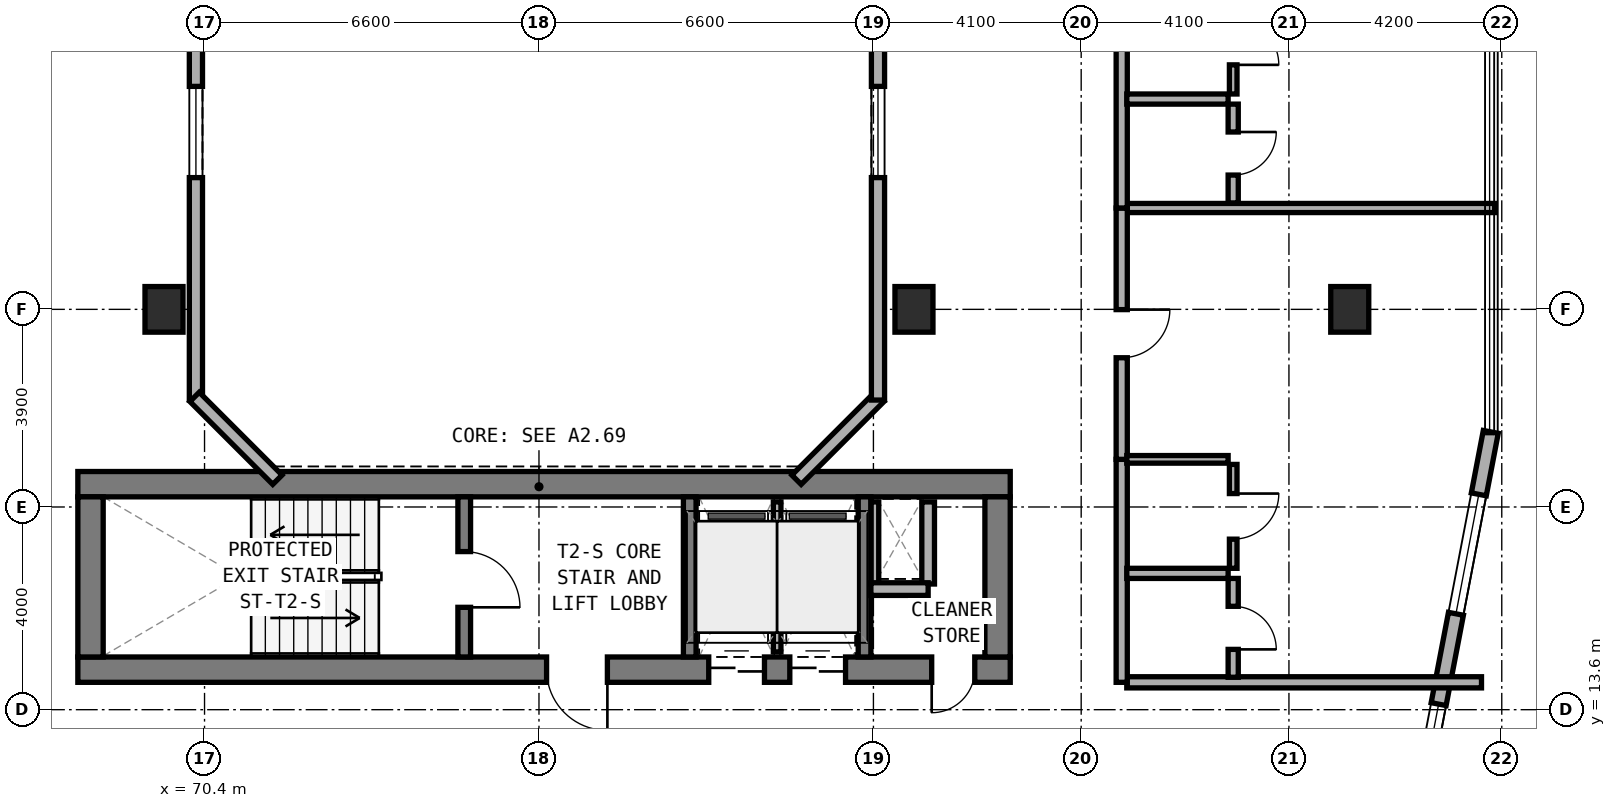
"""IFC4 building model, lengths in metres.
Left out: names, types, materials, properties, quantities, classifications, styles, units other than length and angle.
Written with IfcOpenShell. Run it as: python <this file> out.ifc"""

import sys

from ifc_helpers import new_model, si_unit, direction, frame, frame_2d, origin, origin_2d, place, context, subcontext, project, spatial, rectangle, extrude, element, fill, save


model = new_model("IFC4")
c1 = context("Model", 3, precision=1e-05, world=origin(), true_north=direction((0.0, 1.0)))
c2 = subcontext(c1, "Body", "Model", "MODEL_VIEW")
j1 = project(units=[si_unit("LENGTHUNIT", "METRE"), si_unit("PLANEANGLEUNIT", "RADIAN")], contexts=[c1])
p1 = place(None, origin())
s1 = spatial("IfcSite", under=j1, at=p1, CompositionType="ELEMENT")
p2 = place(p1, origin())
s2 = spatial("IfcBuilding", under=s1, at=p2, CompositionType="ELEMENT")
p3 = place(p2, frame((0.0, 0.0, 69.5)))
s3 = spatial("IfcBuildingStorey", under=s2, at=p3, CompositionType="ELEMENT", Elevation=69.5)
p4 = place(p3, frame((67.9, 14.39, 0.0), z_axis=(0.0, 0.0, 1.0), x_axis=(1.0, 0.0, 0.0)))
e1 = element("IfcWall", 1, at=p4, inside=s3, PredefinedType="SHEAR", context=c2, shape_type="SweptSolid", body=[
    extrude(rectangle(XDim=18.4, YDim=0.5, at=frame_2d((9.2, 0.0))), origin(), (0.0, 0.0, 1.0), 3.5),
])
p5 = place(p4, frame((9.25, 0.0, 0.0)))
e2 = element("IfcOpeningElement", 2, at=p5, cuts=e1, PredefinedType="OPENING", context=c2, shape_type="SweptSolid", body=[
    extrude(rectangle(XDim=1.2, YDim=2.15, at=frame_2d((0.6, 1.075))), frame((0.0, 0.26, 0.0), z_axis=(0.0, -1.0, 0.0), x_axis=(1.0, 0.0, 0.0)), (0.0, 0.0, 1.0), 0.52),
])
p6 = place(p4, frame((16.85, 0.0, 0.0)))
e3 = element("IfcOpeningElement", 3, at=p6, cuts=e1, PredefinedType="OPENING", context=c2, shape_type="SweptSolid", body=[
    extrude(rectangle(XDim=0.85, YDim=2.1, at=frame_2d((0.425, 1.05))), frame((0.0, 0.26, 0.0), z_axis=(0.0, -1.0, 0.0), x_axis=(1.0, 0.0, 0.0)), (0.0, 0.0, 1.0), 0.52),
])
p7 = place(p4, frame((12.45, 0.0, 0.0)))
e4 = element("IfcOpeningElement", 4, at=p7, cuts=e1, PredefinedType="OPENING", context=c2, shape_type="SweptSolid", body=[
    extrude(rectangle(XDim=1.1, YDim=2.15, at=frame_2d((0.55, 1.075))), frame((0.0, 0.26, 0.0), z_axis=(0.0, -1.0, 0.0), x_axis=(1.0, 0.0, 0.0)), (0.0, 0.0, 1.0), 0.52),
])
p8 = place(p4, frame((14.05, 0.0, 0.0)))
e5 = element("IfcOpeningElement", 5, at=p8, cuts=e1, PredefinedType="OPENING", context=c2, shape_type="SweptSolid", body=[
    extrude(rectangle(XDim=1.1, YDim=2.15, at=frame_2d((0.55, 1.075))), frame((0.0, 0.26, 0.0), z_axis=(0.0, -1.0, 0.0), x_axis=(1.0, 0.0, 0.0)), (0.0, 0.0, 1.0), 0.52),
])
p9 = place(p3, frame((67.9, 18.05, 0.0), z_axis=(0.0, 0.0, 1.0), x_axis=(1.0, 0.0, 0.0)))
e6 = element("IfcWall", 6, at=p9, inside=s3, PredefinedType="SHEAR", context=c2, shape_type="SweptSolid", body=[
    extrude(rectangle(XDim=18.4, YDim=0.5, at=frame_2d((9.2, 0.0))), origin(), (0.0, 0.0, 1.0), 3.5),
])
for number, where, z_axis, x_axis in (
    (7, (68.15, 14.64, 0.0), (0.0, 0.0, 1.0), (0.0, 1.0, 0.0)),
    (8, (86.05, 14.64, 0.0), (0.0, 0.0, 1.0), (0.0, 1.0, 0.0)),
):
    element("IfcWall", number, at=place(p3, frame(where, z_axis=z_axis, x_axis=x_axis)), inside=s3, PredefinedType="SHEAR", context=c2, shape_type="SweptSolid", body=[
        extrude(rectangle(XDim=3.16, YDim=0.5, at=frame_2d((1.58, 0.0))), origin(), (0.0, 0.0, 1.0), 3.5),
    ])
p10 = place(p3, frame((75.525, 14.64, 0.0), z_axis=(0.0, 0.0, 1.0), x_axis=(0.0, 1.0, 0.0)))
e9 = element("IfcWall", 9, at=p10, inside=s3, PredefinedType="STANDARD", context=c2, shape_type="SweptSolid", body=[
    extrude(rectangle(XDim=3.16, YDim=0.25, at=frame_2d((1.58, 0.0))), origin(), (0.0, 0.0, 1.0), 3.25),
])
p11 = place(p10, frame((0.98, 0.0, 0.0)))
e10 = element("IfcOpeningElement", 10, at=p11, cuts=e9, PredefinedType="OPENING", context=c2, shape_type="SweptSolid", body=[
    extrude(rectangle(XDim=1.1, YDim=2.15, at=frame_2d((0.55, 1.075))), frame((0.0, 0.135, 0.0), z_axis=(0.0, -1.0, 0.0), x_axis=(1.0, 0.0, 0.0)), (0.0, 0.0, 1.0), 0.27),
])
for number, where, z_axis, x_axis in (
    (11, (79.975, 14.64, 0.0), (0.0, 0.0, 1.0), (0.0, 1.0, 0.0)),
    (12, (83.425, 14.64, 0.0), (0.0, 0.0, 1.0), (0.0, 1.0, 0.0)),
):
    element("IfcWall", number, at=place(p3, frame(where, z_axis=z_axis, x_axis=x_axis)), inside=s3, PredefinedType="STANDARD", context=c2, shape_type="SweptSolid", body=[
        extrude(rectangle(XDim=3.16, YDim=0.25, at=frame_2d((1.58, 0.0))), origin(), (0.0, 0.0, 1.0), 3.25),
    ])
for number, where, z_axis, x_axis in (
    (13, (93.0, 21.5, 0.0), (0.0, 0.0, 1.0), (1.0, 0.0, 0.0)),
    (14, (69.6, 21.5, 0.0), (0.0, 0.0, 1.0), (1.0, 0.0, 0.0)),
    (15, (84.4, 21.5, 0.0), (0.0, 0.0, 1.0), (1.0, 0.0, 0.0)),
):
    element("IfcColumn", number, at=place(p3, frame(where, z_axis=z_axis, x_axis=x_axis)), inside=s3, PredefinedType="COLUMN", context=c2, shape_type="SweptSolid", body=[
        extrude(rectangle(XDim=0.75, YDim=0.9, at=origin_2d()), origin(), (0.0, 0.0, 1.0), 3.5),
    ])
p12 = place(p3, frame((93.971, 9.62, 0.0), z_axis=(0.0, 0.0, 1.0), x_axis=(0.188087874316, 0.982152203854, 0.0)))
e16 = element("IfcWall", 16, at=p12, inside=s3, PredefinedType="STANDARD", context=c2, shape_type="SweptSolid", body=[
    extrude(rectangle(XDim=9.634, YDim=0.3, at=frame_2d((4.817, 0.0))), origin(), (0.0, 0.0, 1.0), 3.25),
])
p13 = place(p12, frame((0.452, 0.0, 0.85)))
e17 = element("IfcOpeningElement", 17, at=p13, cuts=e16, PredefinedType="OPENING", context=c2, shape_type="SweptSolid", body=[
    extrude(rectangle(XDim=1.5, YDim=1.5, at=frame_2d((0.75, 0.75))), frame((0.0, 0.16, 0.0), z_axis=(0.0, -1.0, 0.0), x_axis=(1.0, 0.0, 0.0)), (0.0, 0.0, 1.0), 0.32),
])
p14 = place(p12, frame((2.964, 0.0, 0.85)))
e18 = element("IfcOpeningElement", 18, at=p14, cuts=e16, PredefinedType="OPENING", context=c2, shape_type="SweptSolid", body=[
    extrude(rectangle(XDim=1.2, YDim=1.5, at=frame_2d((0.6, 0.75))), frame((0.0, 0.16, 0.0), z_axis=(0.0, -1.0, 0.0), x_axis=(1.0, 0.0, 0.0)), (0.0, 0.0, 1.0), 0.32),
])
p15 = place(p12, frame((5.979, 0.0, 0.8)))
e19 = element("IfcOpeningElement", 19, at=p15, cuts=e16, PredefinedType="OPENING", context=c2, shape_type="SweptSolid", body=[
    extrude(rectangle(XDim=2.4, YDim=1.6, at=frame_2d((1.2, 0.8))), frame((0.0, 0.16, 0.0), z_axis=(0.0, -1.0, 0.0), x_axis=(1.0, 0.0, 0.0)), (0.0, 0.0, 1.0), 0.32),
])
p16 = place(p3, frame((82.082, 18.138, 0.0), z_axis=(0.0, 0.0, 1.0), x_axis=(0.707106781187, 0.707106781187, 0.0)))
e20 = element("IfcWall", 20, at=p16, inside=s3, PredefinedType="STANDARD", context=c2, shape_type="SweptSolid", body=[
    extrude(rectangle(XDim=2.311, YDim=0.26, at=frame_2d((1.155, 0.0))), origin(), (0.0, 0.0, 1.0), 3.25),
])
p17 = place(p3, frame((83.69, 19.71, 0.0), z_axis=(0.0, 0.0, 1.0), x_axis=(0.0, 1.0, 0.0)))
e21 = element("IfcWall", 21, at=p17, inside=s3, PredefinedType="STANDARD", context=c2, shape_type="SweptSolid", body=[
    extrude(rectangle(XDim=10.58, YDim=0.26, at=frame_2d((5.29, 0.0))), origin(), (0.0, 0.0, 1.0), 3.25),
])
p18 = place(p17, frame((4.39, 0.0, 0.85)))
e22 = element("IfcOpeningElement", 22, at=p18, cuts=e21, PredefinedType="OPENING", context=c2, shape_type="SweptSolid", body=[
    extrude(rectangle(XDim=1.8, YDim=1.5, at=frame_2d((0.9, 0.75))), frame((0.0, 0.14, 0.0), z_axis=(0.0, -1.0, 0.0), x_axis=(1.0, 0.0, 0.0)), (0.0, 0.0, 1.0), 0.28),
])
p19 = place(p3, frame((70.23, 30.29, 0.0), z_axis=(0.0, 0.0, 1.0), x_axis=(0.0, -1.0, 0.0)))
e23 = element("IfcWall", 23, at=p19, inside=s3, PredefinedType="STANDARD", context=c2, shape_type="SweptSolid", body=[
    extrude(rectangle(XDim=10.58, YDim=0.26, at=frame_2d((5.29, 0.0))), origin(), (0.0, 0.0, 1.0), 3.25),
])
p20 = place(p19, frame((4.39, 0.0, 0.85)))
e24 = element("IfcOpeningElement", 24, at=p20, cuts=e23, PredefinedType="OPENING", context=c2, shape_type="SweptSolid", body=[
    extrude(rectangle(XDim=1.8, YDim=1.5, at=frame_2d((0.9, 0.75))), frame((0.0, 0.14, 0.0), z_axis=(0.0, -1.0, 0.0), x_axis=(1.0, 0.0, 0.0)), (0.0, 0.0, 1.0), 0.28),
])
p21 = place(p3, frame((70.204, 19.772, 0.0), z_axis=(0.0, 0.0, 1.0), x_axis=(0.707053950914, -0.707159607512, 0.0)))
e25 = element("IfcWall", 25, at=p21, inside=s3, PredefinedType="STANDARD", context=c2, shape_type="SweptSolid", body=[
    extrude(rectangle(XDim=2.311, YDim=0.26, at=frame_2d((1.155, 0.0))), origin(), (0.0, 0.0, 1.0), 3.25),
])
p22 = place(p3, frame((83.63, 16.08, 0.0), z_axis=(0.0, 0.0, 1.0), x_axis=(0.0, 1.0, 0.0)))
e26 = element("IfcWall", 26, at=p22, inside=s3, PredefinedType="PARTITIONING", context=c2, shape_type="SweptSolid", body=[
    extrude(rectangle(XDim=1.62, YDim=0.15, at=frame_2d((0.81, 0.0))), origin(), (0.0, 0.0, 1.0), 2.725),
])
p23 = place(p3, frame((84.68, 16.08, 0.0), z_axis=(0.0, 0.0, 1.0), x_axis=(0.0, 1.0, 0.0)))
e27 = element("IfcWall", 27, at=p23, inside=s3, PredefinedType="SOLIDWALL", context=c2, shape_type="SweptSolid", body=[
    extrude(rectangle(XDim=1.62, YDim=0.25, at=frame_2d((0.81, 0.0))), origin(), (0.0, 0.0, 1.0), 3.22),
])
p24 = place(p3, frame((83.55, 15.98, 0.0), z_axis=(0.0, 0.0, 1.0), x_axis=(1.0, 0.0, 0.0)))
e28 = element("IfcWall", 28, at=p24, inside=s3, PredefinedType="SOLIDWALL", context=c2, shape_type="SweptSolid", body=[
    extrude(rectangle(XDim=1.13, YDim=0.25, at=frame_2d((0.565, 0.0))), origin(), (0.0, 0.0, 1.0), 3.22),
])
p25 = place(p3, frame((81.7, 14.74, 0.0), z_axis=(0.0, 0.0, 1.0), x_axis=(0.0, 1.0, 0.0)))
e29 = element("IfcWall", 29, at=p25, inside=s3, PredefinedType="PARTITIONING", context=c2, shape_type="SweptSolid", body=[
    extrude(rectangle(XDim=2.96, YDim=0.15, at=frame_2d((1.48, 0.0))), origin(), (0.0, 0.0, 1.0), 3.22),
])
p26 = place(p3, frame((88.6, 14.14, 0.0), z_axis=(0.0, 0.0, 1.0), x_axis=(1.0, 0.0, 0.0)))
e30 = element("IfcWall", 30, at=p26, inside=s3, PredefinedType="SOLIDWALL", context=c2, shape_type="SweptSolid", body=[
    extrude(rectangle(XDim=7.0, YDim=0.22, at=frame_2d((3.5, 0.0))), origin(), (0.0, 0.0, 1.0), 2.865),
])
p27 = place(p3, frame((88.5, 23.5, 0.0), z_axis=(0.0, 0.0, 1.0), x_axis=(1.0, 0.0, 0.0)))
e31 = element("IfcWall", 31, at=p27, inside=s3, PredefinedType="SOLIDWALL", context=c2, shape_type="SweptSolid", body=[
    extrude(rectangle(XDim=7.36, YDim=0.18, at=frame_2d((3.68, 0.0))), origin(), (0.0, 0.0, 1.0), 2.865),
])
p28 = place(p3, frame((88.5, 14.14, 0.0), z_axis=(0.0, 0.0, 1.0), x_axis=(0.0, 1.0, 0.0)))
e32 = element("IfcWall", 32, at=p28, inside=s3, PredefinedType="SOLIDWALL", context=c2, shape_type="SweptSolid", body=[
    extrude(rectangle(XDim=4.4, YDim=0.22, at=frame_2d((2.2, 0.0))), origin(), (0.0, 0.0, 1.0), 3.22),
])
p29 = place(p3, frame((88.5, 18.54, 0.0), z_axis=(0.0, 0.0, 1.0), x_axis=(0.0, 1.0, 0.0)))
e33 = element("IfcWall", 33, at=p29, inside=s3, PredefinedType="SOLIDWALL", context=c2, shape_type="SweptSolid", body=[
    extrude(rectangle(XDim=4.96, YDim=0.22, at=frame_2d((2.48, 0.0))), origin(), (0.0, 0.0, 1.0), 2.725),
])
p30 = place(p29, frame((2.005, 0.0, 0.0)))
e34 = element("IfcOpeningElement", 34, at=p30, cuts=e33, PredefinedType="OPENING", context=c2, shape_type="SweptSolid", body=[
    extrude(rectangle(XDim=0.95, YDim=2.1, at=frame_2d((0.475, 1.05))), frame((0.0, 0.12, 0.0), z_axis=(0.0, -1.0, 0.0), x_axis=(1.0, 0.0, 0.0)), (0.0, 0.0, 1.0), 0.24),
])
p31 = place(p3, frame((88.6, 16.29, 0.0), z_axis=(0.0, 0.0, 1.0), x_axis=(1.0, 0.0, 0.0)))
e35 = element("IfcWall", 35, at=p31, inside=s3, PredefinedType="PLUMBINGWALL", context=c2, shape_type="SweptSolid", body=[
    extrude(rectangle(XDim=2.0, YDim=0.2, at=frame_2d((1.0, 0.0))), origin(), (0.0, 0.0, 1.0), 3.22),
])
p32 = place(p3, frame((88.6, 18.54, 0.0), z_axis=(0.0, 0.0, 1.0), x_axis=(1.0, 0.0, 0.0)))
e36 = element("IfcWall", 36, at=p32, inside=s3, PredefinedType="PARTITIONING", context=c2, shape_type="SweptSolid", body=[
    extrude(rectangle(XDim=2.0, YDim=0.15, at=frame_2d((1.0, 0.0))), origin(), (0.0, 0.0, 1.0), 3.22),
])
p33 = place(p3, frame((90.7, 14.24, 0.0), z_axis=(0.0, 0.0, 1.0), x_axis=(0.0, 1.0, 0.0)))
e37 = element("IfcWall", 37, at=p33, inside=s3, PredefinedType="PLUMBINGWALL", context=c2, shape_type="SweptSolid", body=[
    extrude(rectangle(XDim=1.95, YDim=0.2, at=frame_2d((0.975, 0.0))), origin(), (0.0, 0.0, 1.0), 3.22),
])
p34 = place(p33, frame((0.55, 0.0, 0.0)))
e38 = element("IfcOpeningElement", 38, at=p34, cuts=e37, PredefinedType="OPENING", context=c2, shape_type="SweptSolid", body=[
    extrude(rectangle(XDim=0.85, YDim=2.1, at=frame_2d((0.425, 1.05))), frame((0.0, 0.11, 0.0), z_axis=(0.0, -1.0, 0.0), x_axis=(1.0, 0.0, 0.0)), (0.0, 0.0, 1.0), 0.22),
])
p35 = place(p3, frame((90.7, 16.39, 0.0), z_axis=(0.0, 0.0, 1.0), x_axis=(0.0, 1.0, 0.0)))
e39 = element("IfcWall", 39, at=p35, inside=s3, PredefinedType="PARTITIONING", context=c2, shape_type="SweptSolid", body=[
    extrude(rectangle(XDim=2.05, YDim=0.15, at=frame_2d((1.025, 0.0))), origin(), (0.0, 0.0, 1.0), 3.22),
])
p36 = place(p35, frame((0.575, 0.0, 0.0)))
e40 = element("IfcOpeningElement", 40, at=p36, cuts=e39, PredefinedType="OPENING", context=c2, shape_type="SweptSolid", body=[
    extrude(rectangle(XDim=0.9, YDim=2.1, at=frame_2d((0.45, 1.05))), frame((0.0, 0.085, 0.0), z_axis=(0.0, -1.0, 0.0), x_axis=(1.0, 0.0, 0.0)), (0.0, 0.0, 1.0), 0.17),
])
p37 = place(p3, frame((88.5, 23.5, 0.0), z_axis=(0.0, 0.0, 1.0), x_axis=(0.0, 1.0, 0.0)))
e41 = element("IfcWall", 41, at=p37, inside=s3, PredefinedType="SOLIDWALL", context=c2, shape_type="SweptSolid", body=[
    extrude(rectangle(XDim=4.4, YDim=0.22, at=frame_2d((2.2, 0.0))), origin(), (0.0, 0.0, 1.0), 3.22),
])
p38 = place(p3, frame((88.6, 25.65, 0.0), z_axis=(0.0, 0.0, 1.0), x_axis=(1.0, 0.0, 0.0)))
e42 = element("IfcWall", 42, at=p38, inside=s3, PredefinedType="PLUMBINGWALL", context=c2, shape_type="SweptSolid", body=[
    extrude(rectangle(XDim=2.0, YDim=0.2, at=frame_2d((1.0, 0.0))), origin(), (0.0, 0.0, 1.0), 3.22),
])
p39 = place(p3, frame((90.7, 23.6, 0.0), z_axis=(0.0, 0.0, 1.0), x_axis=(0.0, 1.0, 0.0)))
e43 = element("IfcWall", 43, at=p39, inside=s3, PredefinedType="PLUMBINGWALL", context=c2, shape_type="SweptSolid", body=[
    extrude(rectangle(XDim=1.95, YDim=0.2, at=frame_2d((0.975, 0.0))), origin(), (0.0, 0.0, 1.0), 3.22),
])
p40 = place(p39, frame((0.55, 0.0, 0.0)))
e44 = element("IfcOpeningElement", 44, at=p40, cuts=e43, PredefinedType="OPENING", context=c2, shape_type="SweptSolid", body=[
    extrude(rectangle(XDim=0.85, YDim=2.1, at=frame_2d((0.425, 1.05))), frame((0.0, 0.11, 0.0), z_axis=(0.0, -1.0, 0.0), x_axis=(1.0, 0.0, 0.0)), (0.0, 0.0, 1.0), 0.22),
])
p41 = place(p3, frame((90.7, 25.75, 0.0), z_axis=(0.0, 0.0, 1.0), x_axis=(0.0, 1.0, 0.0)))
e45 = element("IfcWall", 45, at=p41, inside=s3, PredefinedType="PARTITIONING", context=c2, shape_type="SweptSolid", body=[
    extrude(rectangle(XDim=2.05, YDim=0.15, at=frame_2d((1.025, 0.0))), origin(), (0.0, 0.0, 1.0), 3.22),
])
p42 = place(p41, frame((0.575, 0.0, 0.0)))
e46 = element("IfcOpeningElement", 46, at=p42, cuts=e45, PredefinedType="OPENING", context=c2, shape_type="SweptSolid", body=[
    extrude(rectangle(XDim=0.9, YDim=2.1, at=frame_2d((0.45, 1.05))), frame((0.0, 0.085, 0.0), z_axis=(0.0, -1.0, 0.0), x_axis=(1.0, 0.0, 0.0)), (0.0, 0.0, 1.0), 0.17),
])
p43 = place(p14, origin())
e47 = element("IfcWindow", 47, at=p43, inside=s3, PartitioningType="SINGLE_PANEL", PredefinedType="WINDOW", context=c2, shape_type="SweptSolid", body=[
    extrude(rectangle(XDim=1.2, YDim=1.5, at=frame_2d((0.6, 0.75))), frame((0.0, 0.03, 0.0), z_axis=(0.0, -1.0, 0.0), x_axis=(1.0, 0.0, 0.0)), (0.0, 0.0, 1.0), 0.06),
])
fill(e18, e47)
p44 = place(p15, origin())
e48 = element("IfcWindow", 48, at=p44, inside=s3, PartitioningType="SINGLE_PANEL", PredefinedType="WINDOW", context=c2, shape_type="SweptSolid", body=[
    extrude(rectangle(XDim=2.4, YDim=1.6, at=frame_2d((1.2, 0.8))), frame((0.0, 0.03, 0.0), z_axis=(0.0, -1.0, 0.0), x_axis=(1.0, 0.0, 0.0)), (0.0, 0.0, 1.0), 0.06),
])
fill(e19, e48)
p45 = place(p18, origin())
e49 = element("IfcWindow", 49, at=p45, inside=s3, PartitioningType="SINGLE_PANEL", PredefinedType="WINDOW", context=c2, shape_type="SweptSolid", body=[
    extrude(rectangle(XDim=1.8, YDim=1.5, at=frame_2d((0.9, 0.75))), frame((0.0, 0.03, 0.0), z_axis=(0.0, -1.0, 0.0), x_axis=(1.0, 0.0, 0.0)), (0.0, 0.0, 1.0), 0.06),
])
fill(e22, e49)
p46 = place(p20, origin())
e50 = element("IfcWindow", 50, at=p46, inside=s3, PartitioningType="SINGLE_PANEL", PredefinedType="WINDOW", context=c2, shape_type="SweptSolid", body=[
    extrude(rectangle(XDim=1.8, YDim=1.5, at=frame_2d((0.9, 0.75))), frame((0.0, 0.03, 0.0), z_axis=(0.0, -1.0, 0.0), x_axis=(1.0, 0.0, 0.0)), (0.0, 0.0, 1.0), 0.06),
])
fill(e24, e50)
p47 = place(p11, frame((1.1, 0.0, 0.0), z_axis=(0.0, 0.0, 1.0), x_axis=(-1.0, 0.0, 0.0)))
e51 = element("IfcDoor", 51, at=p47, inside=s3, OperationType="SINGLE_SWING_RIGHT", PredefinedType="DOOR", context=c2, shape_type="SweptSolid", body=[
    extrude(rectangle(XDim=1.1, YDim=2.15, at=frame_2d((0.55, 1.075))), frame((0.0, 0.025, 0.0), z_axis=(0.0, -1.0, 0.0), x_axis=(1.0, 0.0, 0.0)), (0.0, 0.0, 1.0), 0.05),
])
fill(e10, e51)
p48 = place(p5, frame((1.2, 0.0, 0.0), z_axis=(0.0, 0.0, 1.0), x_axis=(-1.0, 0.0, 0.0)))
e52 = element("IfcDoor", 52, at=p48, inside=s3, OperationType="SINGLE_SWING_LEFT", PredefinedType="DOOR", context=c2, shape_type="SweptSolid", body=[
    extrude(rectangle(XDim=1.2, YDim=2.15, at=frame_2d((0.6, 1.075))), frame((0.0, 0.025, 0.0), z_axis=(0.0, -1.0, 0.0), x_axis=(1.0, 0.0, 0.0)), (0.0, 0.0, 1.0), 0.05),
])
fill(e2, e52)
p49 = place(p6, frame((0.85, 0.0, 0.0), z_axis=(0.0, 0.0, 1.0), x_axis=(-1.0, 0.0, 0.0)))
e53 = element("IfcDoor", 53, at=p49, inside=s3, OperationType="SINGLE_SWING_RIGHT", PredefinedType="DOOR", context=c2, shape_type="SweptSolid", body=[
    extrude(rectangle(XDim=0.85, YDim=2.1, at=frame_2d((0.425, 1.05))), frame((0.0, 0.025, 0.0), z_axis=(0.0, -1.0, 0.0), x_axis=(1.0, 0.0, 0.0)), (0.0, 0.0, 1.0), 0.05),
])
fill(e3, e53)
p50 = place(p7, frame((1.1, 0.0, 0.0), z_axis=(0.0, 0.0, 1.0), x_axis=(-1.0, 0.0, 0.0)))
e54 = element("IfcDoor", 54, at=p50, inside=s3, OperationType="DOUBLE_DOOR_SLIDING", PredefinedType="DOOR", context=c2, shape_type="SweptSolid", body=[
    extrude(rectangle(XDim=1.1, YDim=2.15, at=frame_2d((0.55, 1.075))), frame((0.0, 0.025, 0.0), z_axis=(0.0, -1.0, 0.0), x_axis=(1.0, 0.0, 0.0)), (0.0, 0.0, 1.0), 0.05),
])
fill(e4, e54)
p51 = place(p8, frame((1.1, 0.0, 0.0), z_axis=(0.0, 0.0, 1.0), x_axis=(-1.0, 0.0, 0.0)))
e55 = element("IfcDoor", 55, at=p51, inside=s3, OperationType="DOUBLE_DOOR_SLIDING", PredefinedType="DOOR", context=c2, shape_type="SweptSolid", body=[
    extrude(rectangle(XDim=1.1, YDim=2.15, at=frame_2d((0.55, 1.075))), frame((0.0, 0.025, 0.0), z_axis=(0.0, -1.0, 0.0), x_axis=(1.0, 0.0, 0.0)), (0.0, 0.0, 1.0), 0.05),
])
fill(e5, e55)
p52 = place(p30, frame((0.95, 0.0, 0.0), z_axis=(0.0, 0.0, 1.0), x_axis=(-1.0, 0.0, 0.0)))
e56 = element("IfcDoor", 56, at=p52, inside=s3, OperationType="SINGLE_SWING_LEFT", PredefinedType="DOOR", context=c2, shape_type="SweptSolid", body=[
    extrude(rectangle(XDim=0.95, YDim=2.1, at=frame_2d((0.475, 1.05))), frame((0.0, 0.025, 0.0), z_axis=(0.0, -1.0, 0.0), x_axis=(1.0, 0.0, 0.0)), (0.0, 0.0, 1.0), 0.05),
])
fill(e34, e56)
p53 = place(p34, frame((0.85, 0.0, 0.0), z_axis=(0.0, 0.0, 1.0), x_axis=(-1.0, 0.0, 0.0)))
e57 = element("IfcDoor", 57, at=p53, inside=s3, OperationType="SINGLE_SWING_RIGHT", PredefinedType="DOOR", context=c2, shape_type="SweptSolid", body=[
    extrude(rectangle(XDim=0.85, YDim=2.1, at=frame_2d((0.425, 1.05))), frame((0.0, 0.025, 0.0), z_axis=(0.0, -1.0, 0.0), x_axis=(1.0, 0.0, 0.0)), (0.0, 0.0, 1.0), 0.05),
])
fill(e38, e57)
p54 = place(p36, frame((0.9, 0.0, 0.0), z_axis=(0.0, 0.0, 1.0), x_axis=(-1.0, 0.0, 0.0)))
e58 = element("IfcDoor", 58, at=p54, inside=s3, OperationType="SINGLE_SWING_LEFT", PredefinedType="DOOR", context=c2, shape_type="SweptSolid", body=[
    extrude(rectangle(XDim=0.9, YDim=2.1, at=frame_2d((0.45, 1.05))), frame((0.0, 0.025, 0.0), z_axis=(0.0, -1.0, 0.0), x_axis=(1.0, 0.0, 0.0)), (0.0, 0.0, 1.0), 0.05),
])
fill(e40, e58)
p55 = place(p40, frame((0.85, 0.0, 0.0), z_axis=(0.0, 0.0, 1.0), x_axis=(-1.0, 0.0, 0.0)))
e59 = element("IfcDoor", 59, at=p55, inside=s3, OperationType="SINGLE_SWING_LEFT", PredefinedType="DOOR", context=c2, shape_type="SweptSolid", body=[
    extrude(rectangle(XDim=0.85, YDim=2.1, at=frame_2d((0.425, 1.05))), frame((0.0, 0.025, 0.0), z_axis=(0.0, -1.0, 0.0), x_axis=(1.0, 0.0, 0.0)), (0.0, 0.0, 1.0), 0.05),
])
fill(e44, e59)
p56 = place(p42, frame((0.9, 0.0, 0.0), z_axis=(0.0, 0.0, 1.0), x_axis=(-1.0, 0.0, 0.0)))
e60 = element("IfcDoor", 60, at=p56, inside=s3, OperationType="SINGLE_SWING_RIGHT", PredefinedType="DOOR", context=c2, shape_type="SweptSolid", body=[
    extrude(rectangle(XDim=0.9, YDim=2.1, at=frame_2d((0.45, 1.05))), frame((0.0, 0.025, 0.0), z_axis=(0.0, -1.0, 0.0), x_axis=(1.0, 0.0, 0.0)), (0.0, 0.0, 1.0), 0.05),
])
fill(e46, e60)
save(model, sys.argv[1])
